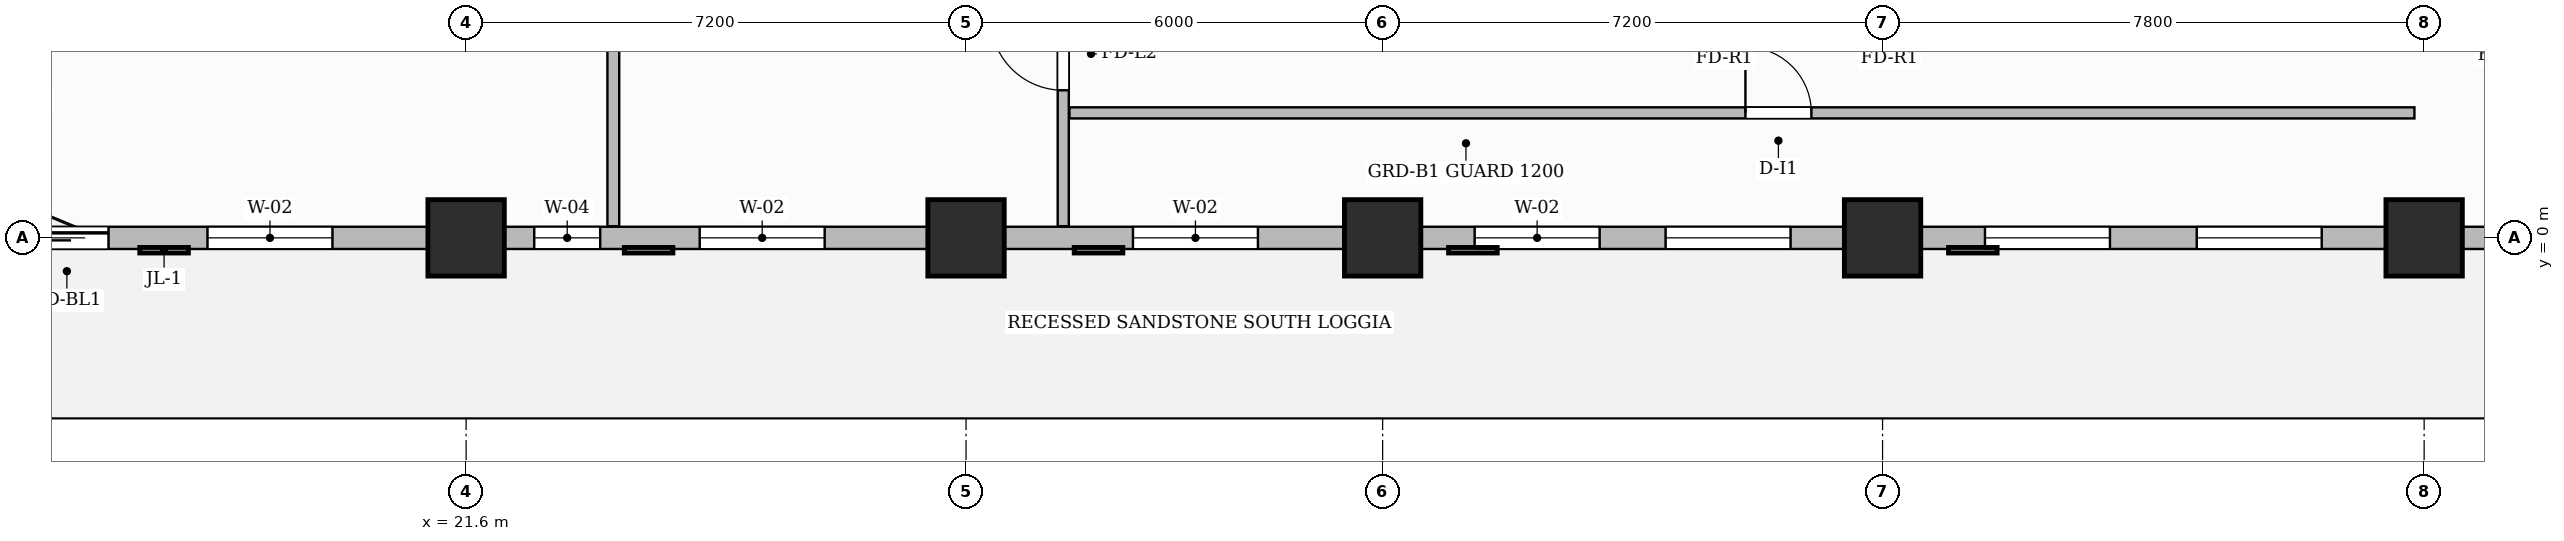
"""IFC4 building model, lengths in metres.
Left out: names, types, materials, properties, quantities, classifications, styles, units other than length and angle.
Written with IfcOpenShell. Run it as: python <this file> out.ifc"""

import sys

from ifc_helpers import new_model, si_unit, direction, frame, frame_2d, origin, origin_2d, place, context, subcontext, project, spatial, rectangle, extrude, source, transform, mapped, element, fill, save


model = new_model("IFC4")
c1 = context("Model", 3, precision=1e-05, world=origin(), true_north=direction((0.0, 1.0)))
c2 = subcontext(c1, "Body", "Model", "MODEL_VIEW")
j1 = project(units=[si_unit("LENGTHUNIT", "METRE"), si_unit("PLANEANGLEUNIT", "RADIAN")], contexts=[c1])
p1 = place(None, origin())
s1 = spatial("IfcSite", under=j1, at=p1, CompositionType="ELEMENT")
p2 = place(p1, origin())
s2 = spatial("IfcBuilding", under=s1, at=p2, CompositionType="ELEMENT")
p3 = place(p2, frame((0.0, 0.0, 84.2)))
s3 = spatial("IfcBuildingStorey", under=s2, at=p3, CompositionType="ELEMENT", Elevation=84.2)
m1 = source(origin(), c2, "Body", "SweptSolid", [
    extrude(rectangle(XDim=1.1, YDim=1.1, at=origin_2d()), origin(), (0.0, 0.0, 1.0), 3.7),
])
for number, where, z_axis, x_axis in (
    (1, (21.6, 0.0, 0.0), (0.0, 0.0, 1.0), (1.0, 0.0, 0.0)),
    (2, (28.8, 0.0, 0.0), (0.0, 0.0, 1.0), (1.0, 0.0, 0.0)),
    (3, (34.8, 0.0, 0.0), (0.0, 0.0, 1.0), (1.0, 0.0, 0.0)),
    (4, (42.0, 0.0, 0.0), (0.0, 0.0, 1.0), (1.0, 0.0, 0.0)),
    (5, (49.8, 0.0, 0.0), (0.0, 0.0, 1.0), (1.0, 0.0, 0.0)),
):
    element("IfcColumn", number, at=place(p3, frame(where, z_axis=z_axis, x_axis=x_axis)), inside=s3, PredefinedType="COLUMN", context=c2, shape_type="MappedRepresentation", body=[
        mapped(m1, transform((0.0, 0.0, 0.0), scale=1.0)),
    ])
p4 = place(p3, frame((30.2, 0.168, 0.0), z_axis=(0.0, 0.0, 1.0), x_axis=(0.0, 1.0, 0.0)))
e6 = element("IfcWall", 6, at=p4, inside=s3, PredefinedType="PARTITIONING", context=c2, shape_type="SweptSolid", body=[
    extrude(rectangle(XDim=9.692, YDim=0.16, at=frame_2d((4.846, 0.0))), origin(), (0.0, 0.0, 1.0), 3.45),
])
p5 = place(p4, frame((1.957, 0.0, 0.0)))
e7 = element("IfcOpeningElement", 7, at=p5, cuts=e6, PredefinedType="OPENING", context=c2, shape_type="SweptSolid", body=[
    extrude(rectangle(XDim=1.05, YDim=2.15, at=frame_2d((0.525, 1.075))), frame((0.0, 0.09, 0.0), z_axis=(0.0, -1.0, 0.0), x_axis=(1.0, 0.0, 0.0)), (0.0, 0.0, 1.0), 0.18),
])
p6 = place(p3, frame((30.29, 1.8, 0.0), z_axis=(0.0, 0.0, 1.0), x_axis=(1.0, 0.0, 0.0)))
e8 = element("IfcWall", 8, at=p6, inside=s3, PredefinedType="PARTITIONING", context=c2, shape_type="SweptSolid", body=[
    extrude(rectangle(XDim=19.37, YDim=0.16, at=frame_2d((9.685, 0.0))), origin(), (0.0, 0.0, 1.0), 3.45),
])
p7 = place(p6, frame((9.735, 0.0, 0.0)))
e9 = element("IfcOpeningElement", 9, at=p7, cuts=e8, PredefinedType="OPENING", context=c2, shape_type="SweptSolid", body=[
    extrude(rectangle(XDim=0.95, YDim=2.15, at=frame_2d((0.475, 1.075))), frame((0.0, 0.09, 0.0), z_axis=(0.0, -1.0, 0.0), x_axis=(1.0, 0.0, 0.0)), (0.0, 0.0, 1.0), 0.18),
])
p8 = place(p3, frame((23.72, 0.168, 0.0), z_axis=(0.0, 0.0, 1.0), x_axis=(0.0, 1.0, 0.0)))
e10 = element("IfcWall", 10, at=p8, inside=s3, PredefinedType="PARTITIONING", context=c2, shape_type="SweptSolid", body=[
    extrude(rectangle(XDim=9.692, YDim=0.17, at=frame_2d((4.846, 0.0))), origin(), (0.0, 0.0, 1.0), 3.45),
])
p9 = place(p3, frame((14.4, 0.0, 0.0), z_axis=(0.0, 0.0, 1.0), x_axis=(1.0, 0.0, 0.0)))
e11 = element("IfcWall", 11, at=p9, inside=s3, PredefinedType="SOLIDWALL", context=c2, shape_type="SweptSolid", body=[
    extrude(rectangle(XDim=43.2, YDim=0.32, at=frame_2d((21.6, 0.0))), origin(), (0.0, 0.0, 1.0), 2.885),
])
p10 = place(p9, frame((0.85, 0.0, 0.0)))
e12 = element("IfcOpeningElement", 12, at=p10, cuts=e11, PredefinedType="OPENING", context=c2, shape_type="SweptSolid", body=[
    extrude(rectangle(XDim=1.2, YDim=2.2, at=frame_2d((0.6, 1.1))), frame((0.0, 0.17, 0.0), z_axis=(0.0, -1.0, 0.0), x_axis=(1.0, 0.0, 0.0)), (0.0, 0.0, 1.0), 0.34),
])
p11 = place(p9, frame((3.475, 0.0, 0.8)))
e13 = element("IfcOpeningElement", 13, at=p11, cuts=e11, PredefinedType="OPENING", context=c2, shape_type="SweptSolid", body=[
    extrude(rectangle(XDim=1.8, YDim=1.85, at=frame_2d((0.9, 0.925))), frame((0.0, 0.17, 0.0), z_axis=(0.0, -1.0, 0.0), x_axis=(1.0, 0.0, 0.0)), (0.0, 0.0, 1.0), 0.34),
])
p12 = place(p9, frame((8.181, 0.0, 0.8)))
e14 = element("IfcOpeningElement", 14, at=p12, cuts=e11, PredefinedType="OPENING", context=c2, shape_type="SweptSolid", body=[
    extrude(rectangle(XDim=0.95, YDim=1.75, at=frame_2d((0.475, 0.875))), frame((0.0, 0.17, 0.0), z_axis=(0.0, -1.0, 0.0), x_axis=(1.0, 0.0, 0.0)), (0.0, 0.0, 1.0), 0.34),
])
p13 = place(p9, frame((10.564, 0.0, 0.8)))
e15 = element("IfcOpeningElement", 15, at=p13, cuts=e11, PredefinedType="OPENING", context=c2, shape_type="SweptSolid", body=[
    extrude(rectangle(XDim=1.8, YDim=1.85, at=frame_2d((0.9, 0.925))), frame((0.0, 0.17, 0.0), z_axis=(0.0, -1.0, 0.0), x_axis=(1.0, 0.0, 0.0)), (0.0, 0.0, 1.0), 0.34),
])
p14 = place(p9, frame((16.804, 0.0, 0.8)))
e16 = element("IfcOpeningElement", 16, at=p14, cuts=e11, PredefinedType="OPENING", context=c2, shape_type="SweptSolid", body=[
    extrude(rectangle(XDim=1.8, YDim=1.85, at=frame_2d((0.9, 0.925))), frame((0.0, 0.17, 0.0), z_axis=(0.0, -1.0, 0.0), x_axis=(1.0, 0.0, 0.0)), (0.0, 0.0, 1.0), 0.34),
])
p15 = place(p9, frame((21.725, 0.0, 0.8)))
e17 = element("IfcOpeningElement", 17, at=p15, cuts=e11, PredefinedType="OPENING", context=c2, shape_type="SweptSolid", body=[
    extrude(rectangle(XDim=1.8, YDim=1.85, at=frame_2d((0.9, 0.925))), frame((0.0, 0.17, 0.0), z_axis=(0.0, -1.0, 0.0), x_axis=(1.0, 0.0, 0.0)), (0.0, 0.0, 1.0), 0.34),
])
p16 = place(p9, frame((24.475, 0.0, 0.8)))
e18 = element("IfcOpeningElement", 18, at=p16, cuts=e11, PredefinedType="OPENING", context=c2, shape_type="SweptSolid", body=[
    extrude(rectangle(XDim=1.8, YDim=1.85, at=frame_2d((0.9, 0.925))), frame((0.0, 0.17, 0.0), z_axis=(0.0, -1.0, 0.0), x_axis=(1.0, 0.0, 0.0)), (0.0, 0.0, 1.0), 0.34),
])
p17 = place(p9, frame((29.075, 0.0, 0.8)))
e19 = element("IfcOpeningElement", 19, at=p17, cuts=e11, PredefinedType="OPENING", context=c2, shape_type="SweptSolid", body=[
    extrude(rectangle(XDim=1.8, YDim=1.85, at=frame_2d((0.9, 0.925))), frame((0.0, 0.17, 0.0), z_axis=(0.0, -1.0, 0.0), x_axis=(1.0, 0.0, 0.0)), (0.0, 0.0, 1.0), 0.34),
])
p18 = place(p9, frame((32.125, 0.0, 0.8)))
e20 = element("IfcOpeningElement", 20, at=p18, cuts=e11, PredefinedType="OPENING", context=c2, shape_type="SweptSolid", body=[
    extrude(rectangle(XDim=1.8, YDim=1.85, at=frame_2d((0.9, 0.925))), frame((0.0, 0.17, 0.0), z_axis=(0.0, -1.0, 0.0), x_axis=(1.0, 0.0, 0.0)), (0.0, 0.0, 1.0), 0.34),
])
p19 = place(p9, frame((36.875, 0.0, 0.8)))
e21 = element("IfcOpeningElement", 21, at=p19, cuts=e11, PredefinedType="OPENING", context=c2, shape_type="SweptSolid", body=[
    extrude(rectangle(XDim=1.8, YDim=1.85, at=frame_2d((0.9, 0.925))), frame((0.0, 0.17, 0.0), z_axis=(0.0, -1.0, 0.0), x_axis=(1.0, 0.0, 0.0)), (0.0, 0.0, 1.0), 0.34),
])
p20 = place(p9, frame((39.925, 0.0, 0.8)))
e22 = element("IfcOpeningElement", 22, at=p20, cuts=e11, PredefinedType="OPENING", context=c2, shape_type="SweptSolid", body=[
    extrude(rectangle(XDim=1.8, YDim=1.85, at=frame_2d((0.9, 0.925))), frame((0.0, 0.17, 0.0), z_axis=(0.0, -1.0, 0.0), x_axis=(1.0, 0.0, 0.0)), (0.0, 0.0, 1.0), 0.34),
])
m2 = source(origin(), c2, "Body", "SweptSolid", [
    extrude(rectangle(XDim=1.05, YDim=2.15, at=frame_2d((0.525, 1.075))), frame((0.0, 0.025, 0.0), z_axis=(0.0, -1.0, 0.0), x_axis=(1.0, 0.0, 0.0)), (0.0, 0.0, 1.0), 0.05),
])
p21 = place(p5, origin())
e23 = element("IfcDoor", 23, at=p21, inside=s3, OperationType="SINGLE_SWING_RIGHT", PredefinedType="DOOR", context=c2, shape_type="MappedRepresentation", body=[
    mapped(m2, transform((0.0, 0.0, 0.0), scale=1.0)),
])
fill(e7, e23)
m3 = source(origin(), c2, "Body", "SweptSolid", [
    extrude(rectangle(XDim=0.95, YDim=2.15, at=frame_2d((0.475, 1.075))), frame((0.0, 0.025, 0.0), z_axis=(0.0, -1.0, 0.0), x_axis=(1.0, 0.0, 0.0)), (0.0, 0.0, 1.0), 0.05),
])
p22 = place(p7, origin())
e24 = element("IfcDoor", 24, at=p22, inside=s3, OperationType="SINGLE_SWING_LEFT", PredefinedType="DOOR", context=c2, shape_type="MappedRepresentation", body=[
    mapped(m3, transform((0.0, 0.0, 0.0), scale=1.0)),
])
fill(e9, e24)
m4 = source(origin(), c2, "Body", "SweptSolid", [
    extrude(rectangle(XDim=1.2, YDim=2.2, at=frame_2d((0.6, 1.1))), frame((0.0, 0.025, 0.0), z_axis=(0.0, -1.0, 0.0), x_axis=(1.0, 0.0, 0.0)), (0.0, 0.0, 1.0), 0.05),
])
p23 = place(p10, origin())
e25 = element("IfcDoor", 25, at=p23, inside=s3, OperationType="SLIDING_TO_LEFT", PredefinedType="DOOR", context=c2, shape_type="MappedRepresentation", body=[
    mapped(m4, transform((0.0, 0.0, 0.0), scale=1.0)),
])
fill(e12, e25)
m5 = source(origin(), c2, "Body", "SweptSolid", [
    extrude(rectangle(XDim=1.8, YDim=1.85, at=frame_2d((0.9, 0.925))), frame((0.0, 0.03, 0.0), z_axis=(0.0, -1.0, 0.0), x_axis=(1.0, 0.0, 0.0)), (0.0, 0.0, 1.0), 0.06),
])
p24 = place(p11, origin())
e26 = element("IfcWindow", 26, at=p24, inside=s3, PartitioningType="DOUBLE_PANEL_VERTICAL", PredefinedType="WINDOW", context=c2, shape_type="MappedRepresentation", body=[
    mapped(m5, transform((0.0, 0.0, 0.0), scale=1.0)),
])
fill(e13, e26)
m6 = source(origin(), c2, "Body", "SweptSolid", [
    extrude(rectangle(XDim=0.95, YDim=1.75, at=frame_2d((0.475, 0.875))), frame((0.0, 0.03, 0.0), z_axis=(0.0, -1.0, 0.0), x_axis=(1.0, 0.0, 0.0)), (0.0, 0.0, 1.0), 0.06),
])
p25 = place(p12, origin())
e27 = element("IfcWindow", 27, at=p25, inside=s3, PartitioningType="SINGLE_PANEL", PredefinedType="WINDOW", context=c2, shape_type="MappedRepresentation", body=[
    mapped(m6, transform((0.0, 0.0, 0.0), scale=1.0)),
])
fill(e14, e27)
p26 = place(p13, origin())
e28 = element("IfcWindow", 28, at=p26, inside=s3, PartitioningType="DOUBLE_PANEL_VERTICAL", PredefinedType="WINDOW", context=c2, shape_type="MappedRepresentation", body=[
    mapped(m5, transform((0.0, 0.0, 0.0), scale=1.0)),
])
fill(e15, e28)
p27 = place(p14, origin())
e29 = element("IfcWindow", 29, at=p27, inside=s3, PartitioningType="DOUBLE_PANEL_VERTICAL", PredefinedType="WINDOW", context=c2, shape_type="MappedRepresentation", body=[
    mapped(m5, transform((0.0, 0.0, 0.0), scale=1.0)),
])
fill(e16, e29)
p28 = place(p15, origin())
e30 = element("IfcWindow", 30, at=p28, inside=s3, PartitioningType="DOUBLE_PANEL_VERTICAL", PredefinedType="WINDOW", context=c2, shape_type="MappedRepresentation", body=[
    mapped(m5, transform((0.0, 0.0, 0.0), scale=1.0)),
])
fill(e17, e30)
p29 = place(p16, origin())
e31 = element("IfcWindow", 31, at=p29, inside=s3, PartitioningType="DOUBLE_PANEL_VERTICAL", PredefinedType="WINDOW", context=c2, shape_type="MappedRepresentation", body=[
    mapped(m5, transform((0.0, 0.0, 0.0), scale=1.0)),
])
fill(e18, e31)
p30 = place(p17, origin())
e32 = element("IfcWindow", 32, at=p30, inside=s3, PartitioningType="DOUBLE_PANEL_VERTICAL", PredefinedType="WINDOW", context=c2, shape_type="MappedRepresentation", body=[
    mapped(m5, transform((0.0, 0.0, 0.0), scale=1.0)),
])
fill(e19, e32)
p31 = place(p18, origin())
e33 = element("IfcWindow", 33, at=p31, inside=s3, PartitioningType="DOUBLE_PANEL_VERTICAL", PredefinedType="WINDOW", context=c2, shape_type="MappedRepresentation", body=[
    mapped(m5, transform((0.0, 0.0, 0.0), scale=1.0)),
])
fill(e20, e33)
save(model, sys.argv[1])
